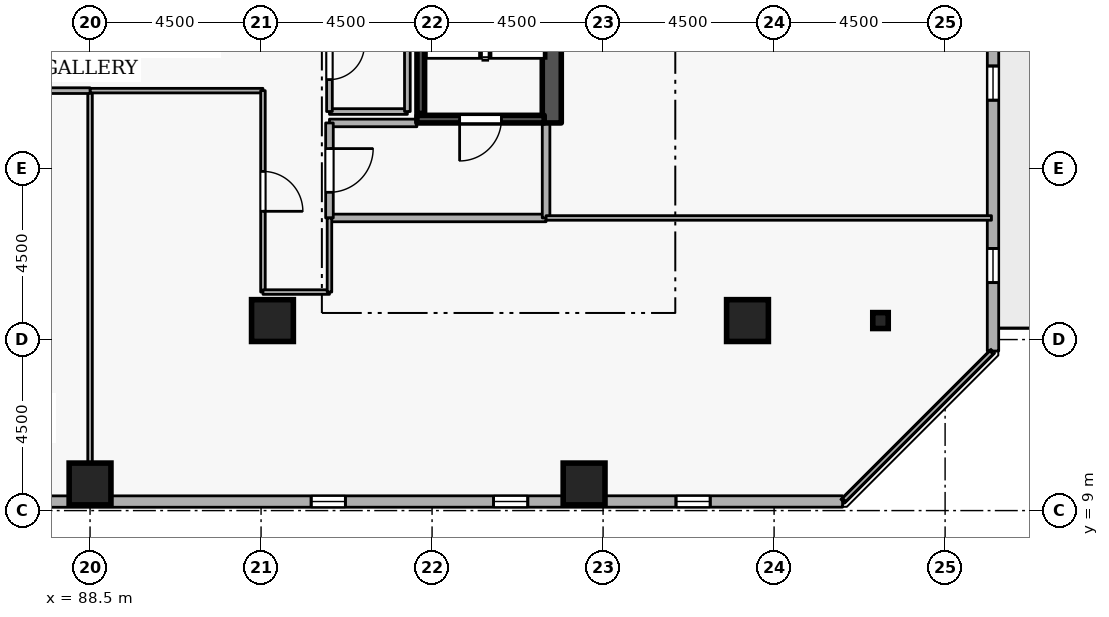
"""IFC4 building model, lengths in metres.
Left out: names, types, materials, properties, quantities, classifications, styles, units other than length and angle.
Written with IfcOpenShell. Run it as: python <this file> out.ifc"""

import sys

from ifc_helpers import new_model, si_unit, direction, frame, frame_2d, origin, origin_2d, place, context, subcontext, project, spatial, rectangle, i_section, extrude, element, fill, save


model = new_model("IFC4")
c1 = context("Model", 3, precision=1e-05, world=origin(), true_north=direction((0.0, 1.0)))
c2 = subcontext(c1, "Body", "Model", "MODEL_VIEW")
j1 = project(units=[si_unit("LENGTHUNIT", "METRE"), si_unit("PLANEANGLEUNIT", "RADIAN")], contexts=[c1])
p1 = place(None, origin())
s1 = spatial("IfcSite", under=j1, at=p1, CompositionType="ELEMENT")
p2 = place(p1, origin())
s2 = spatial("IfcBuilding", under=s1, at=p2, CompositionType="ELEMENT")
p3 = place(p2, frame((0.0, 0.0, 152.7)))
s3 = spatial("IfcBuildingStorey", under=s2, at=p3, CompositionType="ELEMENT", Elevation=152.7)
p4 = place(p3, frame((100.65, 19.2, 0.0), z_axis=(0.0, 0.0, 1.0), x_axis=(0.0, 1.0, 0.0)))
e1 = element("IfcWall", 1, at=p4, inside=s3, PredefinedType="SHEAR", context=c2, shape_type="SweptSolid", body=[
    extrude(rectangle(XDim=15.6, YDim=0.5, at=frame_2d((7.8, 0.0))), origin(), (0.0, 0.0, 1.0), 3.6),
])
for number, where, z_axis, x_axis in (
    (2, (105.8, 14.0, 0.0), (0.0, 0.0, 1.0), (1.0, 0.0, 0.0)),
    (3, (101.5, 9.7, 0.0), (0.0, 0.0, 1.0), (1.0, 0.0, 0.0)),
    (4, (88.5, 9.7, 0.0), (0.0, 0.0, 1.0), (1.0, 0.0, 0.0)),
    (5, (93.3, 14.0, 0.0), (0.0, 0.0, 1.0), (1.0, 0.0, 0.0)),
):
    element("IfcColumn", number, at=place(p3, frame(where, z_axis=z_axis, x_axis=x_axis)), inside=s3, PredefinedType="COLUMN", context=c2, shape_type="SweptSolid", body=[
        extrude(rectangle(XDim=1.1, YDim=1.1, at=origin_2d()), origin(), (0.0, 0.0, 1.0), 3.6),
    ])
p5 = place(p3, frame((109.3, 14.0, 0.0), z_axis=(0.0, 0.0, 1.0), x_axis=(1.0, 0.0, 0.0)))
e6 = element("IfcColumn", 6, at=p5, inside=s3, PredefinedType="COLUMN", context=c2, shape_type="SweptSolid", body=[
    extrude(i_section(OverallWidth=0.407, OverallDepth=0.419, WebThickness=0.031, FlangeThickness=0.049, FilletRadius=0.015, at=origin_2d()), origin(), (0.0, 0.0, 1.0), 3.6),
])
p6 = place(p3, frame((73.319, 9.235, 0.0), z_axis=(0.0, 0.0, 1.0), x_axis=(0.999999991209, 0.000132597301, 0.0)))
e7 = element("IfcWall", 7, at=p6, inside=s3, PredefinedType="STANDARD", context=c2, shape_type="SweptSolid", body=[
    extrude(rectangle(XDim=34.983, YDim=0.3, at=frame_2d((17.492, 0.0))), origin(), (0.0, 0.0, 1.0), 2.7),
])
p7 = place(p6, frame((6.6, 0.0, 0.72)))
e8 = element("IfcOpeningElement", 8, at=p7, cuts=e7, PredefinedType="OPENING", context=c2, shape_type="SweptSolid", body=[
    extrude(rectangle(XDim=0.9, YDim=1.75, at=frame_2d((0.45, 0.875))), frame((0.0, 0.16, 0.0), z_axis=(0.0, -1.0, 0.0), x_axis=(1.0, 0.0, 0.0)), (0.0, 0.0, 1.0), 0.32),
])
p8 = place(p6, frame((11.4, 0.0, 0.72)))
e9 = element("IfcOpeningElement", 9, at=p8, cuts=e7, PredefinedType="OPENING", context=c2, shape_type="SweptSolid", body=[
    extrude(rectangle(XDim=0.9, YDim=1.75, at=frame_2d((0.45, 0.875))), frame((0.0, 0.16, 0.0), z_axis=(0.0, -1.0, 0.0), x_axis=(1.0, 0.0, 0.0)), (0.0, 0.0, 1.0), 0.32),
])
p9 = place(p6, frame((21.0, 0.0, 0.72)))
e10 = element("IfcOpeningElement", 10, at=p9, cuts=e7, PredefinedType="OPENING", context=c2, shape_type="SweptSolid", body=[
    extrude(rectangle(XDim=0.9, YDim=1.75, at=frame_2d((0.45, 0.875))), frame((0.0, 0.16, 0.0), z_axis=(0.0, -1.0, 0.0), x_axis=(1.0, 0.0, 0.0)), (0.0, 0.0, 1.0), 0.32),
])
p10 = place(p6, frame((25.8, 0.0, 0.72)))
e11 = element("IfcOpeningElement", 11, at=p10, cuts=e7, PredefinedType="OPENING", context=c2, shape_type="SweptSolid", body=[
    extrude(rectangle(XDim=0.9, YDim=1.75, at=frame_2d((0.45, 0.875))), frame((0.0, 0.16, 0.0), z_axis=(0.0, -1.0, 0.0), x_axis=(1.0, 0.0, 0.0)), (0.0, 0.0, 1.0), 0.32),
])
p11 = place(p6, frame((30.6, 0.0, 0.72)))
e12 = element("IfcOpeningElement", 12, at=p11, cuts=e7, PredefinedType="OPENING", context=c2, shape_type="SweptSolid", body=[
    extrude(rectangle(XDim=0.9, YDim=1.75, at=frame_2d((0.45, 0.875))), frame((0.0, 0.16, 0.0), z_axis=(0.0, -1.0, 0.0), x_axis=(1.0, 0.0, 0.0)), (0.0, 0.0, 1.0), 0.32),
])
p12 = place(p3, frame((112.26, 13.198, 0.0), z_axis=(0.0, 0.0, 1.0), x_axis=(0.000132597301, 0.999999991209, 0.0)))
e13 = element("IfcWall", 13, at=p12, inside=s3, PredefinedType="STANDARD", context=c2, shape_type="SweptSolid", body=[
    extrude(rectangle(XDim=34.983, YDim=0.3, at=frame_2d((17.492, 0.0))), origin(), (0.0, 0.0, 1.0), 2.7),
])
p13 = place(p12, frame((21.992, 0.0, 0.0)))
e14 = element("IfcOpeningElement", 14, at=p13, cuts=e13, PredefinedType="OPENING", context=c2, shape_type="SweptSolid", body=[
    extrude(rectangle(XDim=1.0, YDim=2.08, at=frame_2d((0.5, 1.04))), frame((0.0, 0.16, 0.0), z_axis=(0.0, -1.0, 0.0), x_axis=(1.0, 0.0, 0.0)), (0.0, 0.0, 1.0), 0.32),
])
p14 = place(p12, frame((1.8, 0.0, 0.72)))
e15 = element("IfcOpeningElement", 15, at=p14, cuts=e13, PredefinedType="OPENING", context=c2, shape_type="SweptSolid", body=[
    extrude(rectangle(XDim=0.9, YDim=1.75, at=frame_2d((0.45, 0.875))), frame((0.0, 0.16, 0.0), z_axis=(0.0, -1.0, 0.0), x_axis=(1.0, 0.0, 0.0)), (0.0, 0.0, 1.0), 0.32),
])
p15 = place(p12, frame((6.6, 0.0, 0.72)))
e16 = element("IfcOpeningElement", 16, at=p15, cuts=e13, PredefinedType="OPENING", context=c2, shape_type="SweptSolid", body=[
    extrude(rectangle(XDim=0.9, YDim=1.75, at=frame_2d((0.45, 0.875))), frame((0.0, 0.16, 0.0), z_axis=(0.0, -1.0, 0.0), x_axis=(1.0, 0.0, 0.0)), (0.0, 0.0, 1.0), 0.32),
])
p16 = place(p12, frame((11.4, 0.0, 0.72)))
e17 = element("IfcOpeningElement", 17, at=p16, cuts=e13, PredefinedType="OPENING", context=c2, shape_type="SweptSolid", body=[
    extrude(rectangle(XDim=0.9, YDim=1.75, at=frame_2d((0.45, 0.875))), frame((0.0, 0.16, 0.0), z_axis=(0.0, -1.0, 0.0), x_axis=(1.0, 0.0, 0.0)), (0.0, 0.0, 1.0), 0.32),
])
p17 = place(p12, frame((16.2, 0.0, 0.72)))
e18 = element("IfcOpeningElement", 18, at=p17, cuts=e13, PredefinedType="OPENING", context=c2, shape_type="SweptSolid", body=[
    extrude(rectangle(XDim=0.9, YDim=1.75, at=frame_2d((0.45, 0.875))), frame((0.0, 0.16, 0.0), z_axis=(0.0, -1.0, 0.0), x_axis=(1.0, 0.0, 0.0)), (0.0, 0.0, 1.0), 0.32),
])
p18 = place(p12, frame((25.8, 0.0, 0.72)))
e19 = element("IfcOpeningElement", 19, at=p18, cuts=e13, PredefinedType="OPENING", context=c2, shape_type="SweptSolid", body=[
    extrude(rectangle(XDim=0.9, YDim=1.75, at=frame_2d((0.45, 0.875))), frame((0.0, 0.16, 0.0), z_axis=(0.0, -1.0, 0.0), x_axis=(1.0, 0.0, 0.0)), (0.0, 0.0, 1.0), 0.32),
])
p19 = place(p12, frame((30.6, 0.0, 0.72)))
e20 = element("IfcOpeningElement", 20, at=p19, cuts=e13, PredefinedType="OPENING", context=c2, shape_type="SweptSolid", body=[
    extrude(rectangle(XDim=0.9, YDim=1.75, at=frame_2d((0.45, 0.875))), frame((0.0, 0.16, 0.0), z_axis=(0.0, -1.0, 0.0), x_axis=(1.0, 0.0, 0.0)), (0.0, 0.0, 1.0), 0.32),
])
p20 = place(p3, frame((100.45, 19.3, 0.0), z_axis=(0.0, 0.0, 1.0), x_axis=(-1.0, 0.0, 0.0)))
e21 = element("IfcWall", 21, at=p20, inside=s3, PredefinedType="SHEAR", context=c2, shape_type="SweptSolid", body=[
    extrude(rectangle(XDim=3.35, YDim=0.2, at=frame_2d((1.675, 0.0))), origin(), (0.0, 0.0, 1.0), 3.6),
])
p21 = place(p20, frame((1.125, 0.0, 0.0)))
e22 = element("IfcOpeningElement", 22, at=p21, cuts=e21, PredefinedType="OPENING", context=c2, shape_type="SweptSolid", body=[
    extrude(rectangle(XDim=1.1, YDim=2.1, at=frame_2d((0.55, 1.05))), frame((0.0, 0.11, 0.0), z_axis=(0.0, -1.0, 0.0), x_axis=(1.0, 0.0, 0.0)), (0.0, 0.0, 1.0), 0.22),
])
p22 = place(p3, frame((97.203, 26.55, 0.0), z_axis=(0.0, 0.0, 1.0), x_axis=(0.0, -1.0, 0.0)))
e23 = element("IfcWall", 23, at=p22, inside=s3, PredefinedType="SHEAR", context=c2, shape_type="SweptSolid", body=[
    extrude(rectangle(XDim=7.1, YDim=0.2, at=frame_2d((3.55, 0.0))), origin(), (0.0, 0.0, 1.0), 3.6),
])
p23 = place(p3, frame((94.8, 16.7, 0.0), z_axis=(0.0, 0.0, 1.0), x_axis=(1.0, 0.0, 0.0)))
e24 = element("IfcWall", 24, at=p23, inside=s3, PredefinedType="STANDARD", context=c2, shape_type="SweptSolid", body=[
    extrude(rectangle(XDim=5.7, YDim=0.2, at=frame_2d((2.85, 0.0))), origin(), (0.0, 0.0, 1.0), 3.34),
])
p24 = place(p3, frame((100.5, 16.7, 0.0), z_axis=(0.0, 0.0, 1.0), x_axis=(0.0, 1.0, 0.0)))
e25 = element("IfcWall", 25, at=p24, inside=s3, PredefinedType="STANDARD", context=c2, shape_type="SweptSolid", body=[
    extrude(rectangle(XDim=2.5, YDim=0.2, at=frame_2d((1.25, 0.0))), origin(), (0.0, 0.0, 1.0), 3.34),
])
p25 = place(p3, frame((97.1, 19.2, 0.0), z_axis=(0.0, 0.0, 1.0), x_axis=(-1.0, 0.0, 0.0)))
e26 = element("IfcWall", 26, at=p25, inside=s3, PredefinedType="STANDARD", context=c2, shape_type="SweptSolid", body=[
    extrude(rectangle(XDim=2.3, YDim=0.2, at=frame_2d((1.15, 0.0))), origin(), (0.0, 0.0, 1.0), 2.545),
])
p26 = place(p3, frame((94.8, 19.2, 0.0), z_axis=(0.0, 0.0, 1.0), x_axis=(0.0, -1.0, 0.0)))
e27 = element("IfcWall", 27, at=p26, inside=s3, PredefinedType="STANDARD", context=c2, shape_type="SweptSolid", body=[
    extrude(rectangle(XDim=2.5, YDim=0.2, at=frame_2d((1.25, 0.0))), origin(), (0.0, 0.0, 1.0), 3.34),
])
p27 = place(p26, frame((0.675, 0.0, 0.0)))
e28 = element("IfcOpeningElement", 28, at=p27, cuts=e27, PredefinedType="OPENING", context=c2, shape_type="SweptSolid", body=[
    extrude(rectangle(XDim=1.15, YDim=2.1, at=frame_2d((0.575, 1.05))), frame((0.0, 0.11, 0.0), z_axis=(0.0, -1.0, 0.0), x_axis=(1.0, 0.0, 0.0)), (0.0, 0.0, 1.0), 0.22),
])
p28 = place(p3, frame((94.8, 19.5, 0.0), z_axis=(0.0, 0.0, 1.0), x_axis=(1.0, 0.0, 0.0)))
e29 = element("IfcWall", 29, at=p28, inside=s3, PredefinedType="PARTITIONING", context=c2, shape_type="SweptSolid", body=[
    extrude(rectangle(XDim=2.05, YDim=0.15, at=frame_2d((1.025, 0.0))), origin(), (0.0, 0.0, 1.0), 2.545),
])
p29 = place(p3, frame((96.85, 19.5, 0.0), z_axis=(0.0, 0.0, 1.0), x_axis=(0.0, 1.0, 0.0)))
e30 = element("IfcWall", 30, at=p29, inside=s3, PredefinedType="PARTITIONING", context=c2, shape_type="SweptSolid", body=[
    extrude(rectangle(XDim=2.6, YDim=0.15, at=frame_2d((1.3, 0.0))), origin(), (0.0, 0.0, 1.0), 3.34),
])
p30 = place(p3, frame((94.8, 22.1, 0.0), z_axis=(0.0, 0.0, 1.0), x_axis=(0.0, -1.0, 0.0)))
e31 = element("IfcWall", 31, at=p30, inside=s3, PredefinedType="PARTITIONING", context=c2, shape_type="SweptSolid", body=[
    extrude(rectangle(XDim=2.6, YDim=0.15, at=frame_2d((1.3, 0.0))), origin(), (0.0, 0.0, 1.0), 3.34),
])
p31 = place(p30, frame((0.84, 0.0, 0.0)))
e32 = element("IfcOpeningElement", 32, at=p31, cuts=e31, PredefinedType="OPENING", context=c2, shape_type="SweptSolid", body=[
    extrude(rectangle(XDim=0.92, YDim=2.08, at=frame_2d((0.46, 1.04))), frame((0.0, 0.085, 0.0), z_axis=(0.0, -1.0, 0.0), x_axis=(1.0, 0.0, 0.0)), (0.0, 0.0, 1.0), 0.17),
])
p32 = place(p3, frame((88.5, 9.28, 0.0), z_axis=(0.0, 0.0, 1.0), x_axis=(0.0, 1.0, 0.0)))
e33 = element("IfcWall", 33, at=p32, inside=s3, PredefinedType="PARTITIONING", context=c2, shape_type="SweptSolid", body=[
    extrude(rectangle(XDim=10.77, YDim=0.12, at=frame_2d((5.385, 0.0))), origin(), (0.0, 0.0, 1.0), 2.932),
])
p33 = place(p3, frame((88.5, 20.05, 0.0), z_axis=(0.0, 0.0, 1.0), x_axis=(1.0, 0.0, 0.0)))
e34 = element("IfcWall", 34, at=p33, inside=s3, PredefinedType="PARTITIONING", context=c2, shape_type="SweptSolid", body=[
    extrude(rectangle(XDim=4.55, YDim=0.12, at=frame_2d((2.275, 0.0))), origin(), (0.0, 0.0, 1.0), 3.34),
])
p34 = place(p3, frame((93.05, 20.05, 0.0), z_axis=(0.0, 0.0, 1.0), x_axis=(0.0, -1.0, 0.0)))
e35 = element("IfcWall", 35, at=p34, inside=s3, PredefinedType="PARTITIONING", context=c2, shape_type="SweptSolid", body=[
    extrude(rectangle(XDim=5.3, YDim=0.12, at=frame_2d((2.65, 0.0))), origin(), (0.0, 0.0, 1.0), 3.34),
])
p35 = place(p34, frame((2.125, 0.0, 0.0)))
e36 = element("IfcOpeningElement", 36, at=p35, cuts=e35, PredefinedType="OPENING", context=c2, shape_type="SweptSolid", body=[
    extrude(rectangle(XDim=1.05, YDim=2.1, at=frame_2d((0.525, 1.05))), frame((0.0, 0.07, 0.0), z_axis=(0.0, -1.0, 0.0), x_axis=(1.0, 0.0, 0.0)), (0.0, 0.0, 1.0), 0.14),
])
p36 = place(p3, frame((93.05, 14.75, 0.0), z_axis=(0.0, 0.0, 1.0), x_axis=(1.0, 0.0, 0.0)))
e37 = element("IfcWall", 37, at=p36, inside=s3, PredefinedType="PARTITIONING", context=c2, shape_type="SweptSolid", body=[
    extrude(rectangle(XDim=1.75, YDim=0.12, at=frame_2d((0.875, 0.0))), origin(), (0.0, 0.0, 1.0), 3.34),
])
p37 = place(p3, frame((94.8, 14.75, 0.0), z_axis=(0.0, 0.0, 1.0), x_axis=(0.0, 1.0, 0.0)))
e38 = element("IfcWall", 38, at=p37, inside=s3, PredefinedType="PARTITIONING", context=c2, shape_type="SweptSolid", body=[
    extrude(rectangle(XDim=1.95, YDim=0.12, at=frame_2d((0.975, 0.0))), origin(), (0.0, 0.0, 1.0), 3.34),
])
p38 = place(p3, frame((100.5, 16.7, 0.0), z_axis=(0.0, 0.0, 1.0), x_axis=(1.0, 0.0, 0.0)))
e39 = element("IfcWall", 39, at=p38, inside=s3, PredefinedType="PARTITIONING", context=c2, shape_type="SweptSolid", body=[
    extrude(rectangle(XDim=11.72, YDim=0.12, at=frame_2d((5.86, 0.0))), origin(), (0.0, 0.0, 1.0), 3.34),
])
p39 = place(p3, frame((112.22, 13.16, 0.0), z_axis=(0.0, 0.0, 1.0), x_axis=(-0.707106781187, -0.707106781187, 0.0)))
e40 = element("IfcWall", 40, at=p39, inside=s3, PredefinedType="PARTITIONING", context=c2, shape_type="SweptSolid", body=[
    extrude(rectangle(XDim=5.487, YDim=0.12, at=frame_2d((2.743, 0.0))), origin(), (0.0, 0.0, 1.0), 3.34),
])
p40 = place(p3, frame((83.95, 20.05, 0.0), z_axis=(0.0, 0.0, 1.0), x_axis=(1.0, 0.0, 0.0)))
e41 = element("IfcWall", 41, at=p40, inside=s3, PredefinedType="PARTITIONING", context=c2, shape_type="SweptSolid", body=[
    extrude(rectangle(XDim=4.55, YDim=0.15, at=frame_2d((2.275, 0.0))), origin(), (0.0, 0.0, 1.0), 3.34),
])
p41 = place(p9, origin())
e42 = element("IfcWindow", 42, at=p41, inside=s3, PartitioningType="SINGLE_PANEL", PredefinedType="WINDOW", context=c2, shape_type="SweptSolid", body=[
    extrude(rectangle(XDim=0.9, YDim=1.75, at=frame_2d((0.45, 0.875))), frame((0.0, 0.03, 0.0), z_axis=(0.0, -1.0, 0.0), x_axis=(1.0, 0.0, 0.0)), (0.0, 0.0, 1.0), 0.06),
])
fill(e10, e42)
p42 = place(p10, origin())
e43 = element("IfcWindow", 43, at=p42, inside=s3, PartitioningType="SINGLE_PANEL", PredefinedType="WINDOW", context=c2, shape_type="SweptSolid", body=[
    extrude(rectangle(XDim=0.9, YDim=1.75, at=frame_2d((0.45, 0.875))), frame((0.0, 0.03, 0.0), z_axis=(0.0, -1.0, 0.0), x_axis=(1.0, 0.0, 0.0)), (0.0, 0.0, 1.0), 0.06),
])
fill(e11, e43)
p43 = place(p11, origin())
e44 = element("IfcWindow", 44, at=p43, inside=s3, PartitioningType="SINGLE_PANEL", PredefinedType="WINDOW", context=c2, shape_type="SweptSolid", body=[
    extrude(rectangle(XDim=0.9, YDim=1.75, at=frame_2d((0.45, 0.875))), frame((0.0, 0.03, 0.0), z_axis=(0.0, -1.0, 0.0), x_axis=(1.0, 0.0, 0.0)), (0.0, 0.0, 1.0), 0.06),
])
fill(e12, e44)
p44 = place(p14, origin())
e45 = element("IfcWindow", 45, at=p44, inside=s3, PartitioningType="SINGLE_PANEL", PredefinedType="WINDOW", context=c2, shape_type="SweptSolid", body=[
    extrude(rectangle(XDim=0.9, YDim=1.75, at=frame_2d((0.45, 0.875))), frame((0.0, 0.03, 0.0), z_axis=(0.0, -1.0, 0.0), x_axis=(1.0, 0.0, 0.0)), (0.0, 0.0, 1.0), 0.06),
])
fill(e15, e45)
p45 = place(p15, origin())
e46 = element("IfcWindow", 46, at=p45, inside=s3, PartitioningType="SINGLE_PANEL", PredefinedType="WINDOW", context=c2, shape_type="SweptSolid", body=[
    extrude(rectangle(XDim=0.9, YDim=1.75, at=frame_2d((0.45, 0.875))), frame((0.0, 0.03, 0.0), z_axis=(0.0, -1.0, 0.0), x_axis=(1.0, 0.0, 0.0)), (0.0, 0.0, 1.0), 0.06),
])
fill(e16, e46)
p46 = place(p21, origin())
e47 = element("IfcDoor", 47, at=p46, inside=s3, OperationType="SINGLE_SWING_RIGHT", PredefinedType="DOOR", context=c2, shape_type="SweptSolid", body=[
    extrude(rectangle(XDim=1.1, YDim=2.1, at=frame_2d((0.55, 1.05))), frame((0.0, 0.025, 0.0), z_axis=(0.0, -1.0, 0.0), x_axis=(1.0, 0.0, 0.0)), (0.0, 0.0, 1.0), 0.05),
])
fill(e22, e47)
p47 = place(p27, origin())
e48 = element("IfcDoor", 48, at=p47, inside=s3, OperationType="SINGLE_SWING_LEFT", PredefinedType="DOOR", context=c2, shape_type="SweptSolid", body=[
    extrude(rectangle(XDim=1.15, YDim=2.1, at=frame_2d((0.575, 1.05))), frame((0.0, 0.025, 0.0), z_axis=(0.0, -1.0, 0.0), x_axis=(1.0, 0.0, 0.0)), (0.0, 0.0, 1.0), 0.05),
])
fill(e28, e48)
p48 = place(p31, origin())
e49 = element("IfcDoor", 49, at=p48, inside=s3, OperationType="SINGLE_SWING_LEFT", PredefinedType="DOOR", context=c2, shape_type="SweptSolid", body=[
    extrude(rectangle(XDim=0.92, YDim=2.08, at=frame_2d((0.46, 1.04))), frame((0.0, 0.025, 0.0), z_axis=(0.0, -1.0, 0.0), x_axis=(1.0, 0.0, 0.0)), (0.0, 0.0, 1.0), 0.05),
])
fill(e32, e49)
p49 = place(p35, origin())
e50 = element("IfcDoor", 50, at=p49, inside=s3, OperationType="SINGLE_SWING_RIGHT", PredefinedType="DOOR", context=c2, shape_type="SweptSolid", body=[
    extrude(rectangle(XDim=1.05, YDim=2.1, at=frame_2d((0.525, 1.05))), frame((0.0, 0.025, 0.0), z_axis=(0.0, -1.0, 0.0), x_axis=(1.0, 0.0, 0.0)), (0.0, 0.0, 1.0), 0.05),
])
fill(e36, e50)
save(model, sys.argv[1])
